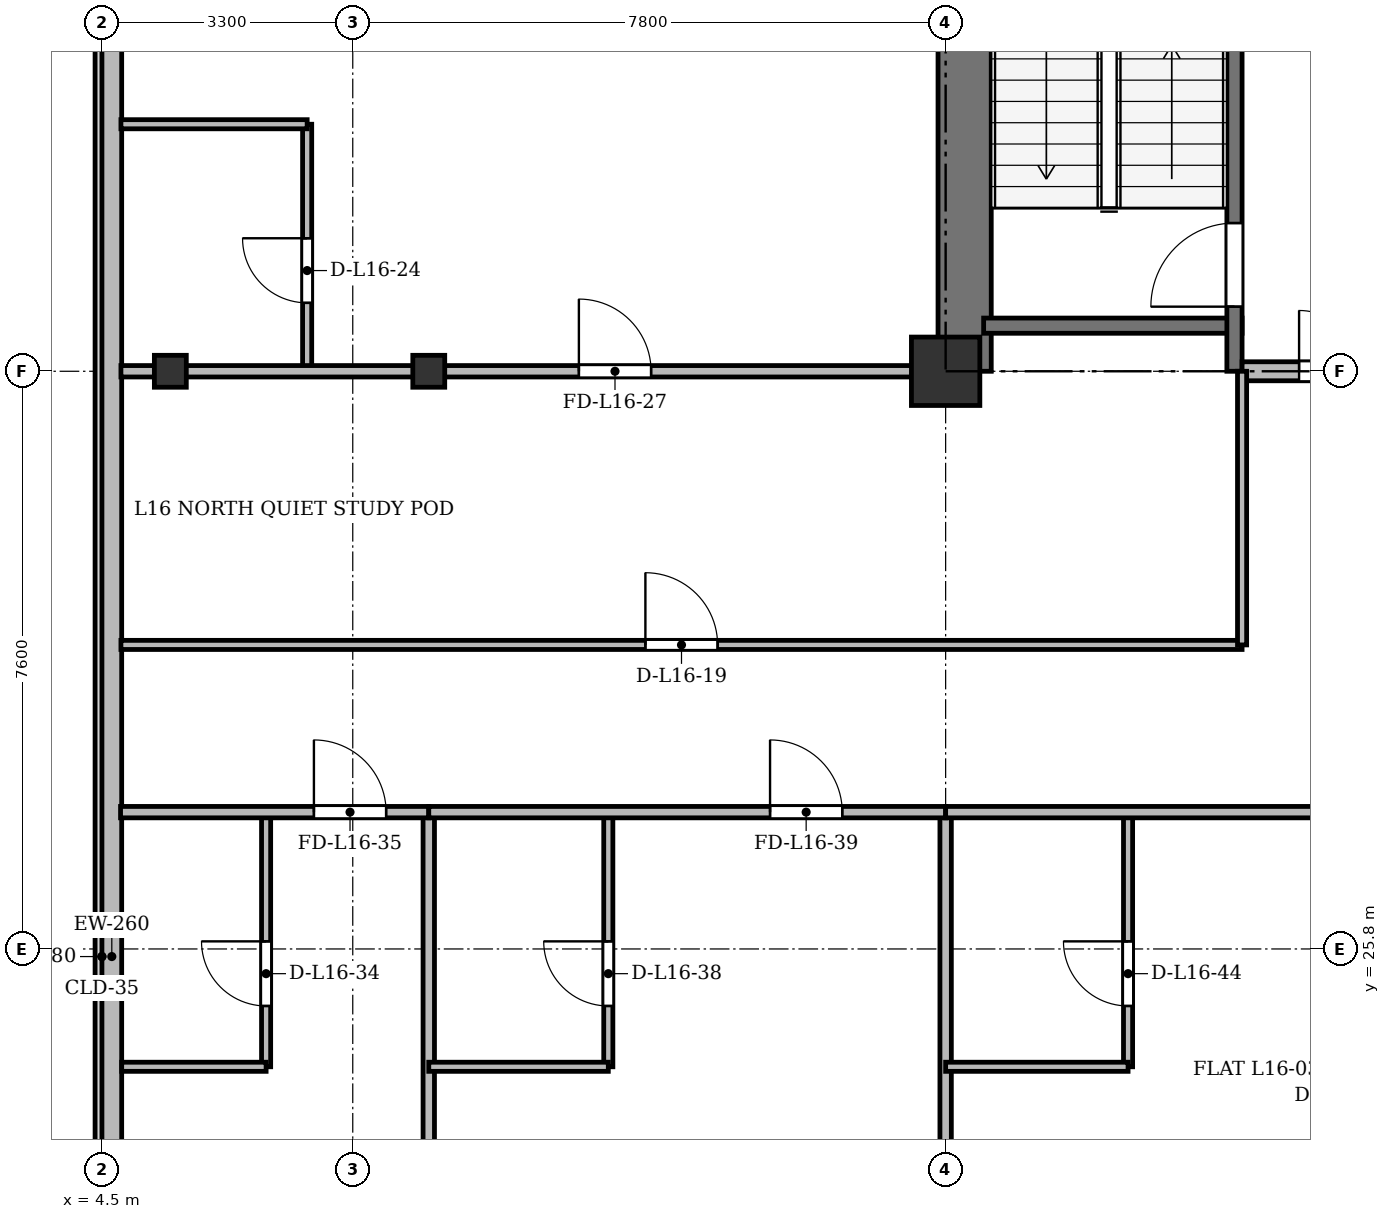
"""IFC4 building model, lengths in metres.
Left out: names, types, materials, properties, quantities, classifications, styles, units other than length and angle.
Written with IfcOpenShell. Run it as: python <this file> out.ifc"""

import sys

from ifc_helpers import new_model, si_unit, direction, frame, frame_2d, origin, origin_2d, place, context, subcontext, project, spatial, rectangle, i_section, extrude, source, transform, mapped, element, fill, save


model = new_model("IFC4")
c1 = context("Model", 3, precision=1e-05, world=origin(), true_north=direction((0.0, 1.0)))
c2 = subcontext(c1, "Body", "Model", "MODEL_VIEW")
j1 = project(units=[si_unit("LENGTHUNIT", "METRE"), si_unit("PLANEANGLEUNIT", "RADIAN")], contexts=[c1])
p1 = place(None, origin())
s1 = spatial("IfcSite", under=j1, at=p1, CompositionType="ELEMENT")
p2 = place(p1, origin())
s2 = spatial("IfcBuilding", under=s1, at=p2, CompositionType="ELEMENT")
p3 = place(p2, frame((0.0, 0.0, 63.1)))
s3 = spatial("IfcBuildingStorey", under=s2, at=p3, CompositionType="ELEMENT", Elevation=63.1)
m1 = source(origin(), c2, "Body", "SweptSolid", [
    extrude(i_section(OverallWidth=0.42, OverallDepth=0.42, WebThickness=0.026, FlangeThickness=0.04, at=origin_2d()), origin(), (0.0, 0.0, 1.0), 3.6),
])
for number, where, z_axis, x_axis in (
    (1, (5.4, 33.4, 0.0), (0.0, 0.0, 1.0), (1.0, 0.0, 0.0)),
    (2, (8.8, 33.4, 0.0), (0.0, 0.0, 1.0), (1.0, 0.0, 0.0)),
):
    element("IfcColumn", number, at=place(p3, frame(where, z_axis=z_axis, x_axis=x_axis)), inside=s3, PredefinedType="COLUMN", context=c2, shape_type="MappedRepresentation", body=[
        mapped(m1, transform((0.0, 0.0, 0.0), x_axis=(1.0, 0.0, 0.0), y_axis=(0.0, 1.0, 0.0), z_axis=(0.0, 0.0, 1.0), scale=1.0)),
    ])
m2 = source(origin(), c2, "Body", "SweptSolid", [
    extrude(rectangle(XDim=0.9, YDim=0.9, at=origin_2d()), origin(), (0.0, 0.0, 1.0), 3.6),
])
p4 = place(p3, frame((15.6, 33.4, 0.0), z_axis=(0.0, 0.0, 1.0), x_axis=(1.0, 0.0, 0.0)))
e3 = element("IfcColumn", 3, at=p4, inside=s3, PredefinedType="COLUMN", context=c2, shape_type="MappedRepresentation", body=[
    mapped(m2, transform((0.0, 0.0, 0.0), x_axis=(1.0, 0.0, 0.0), y_axis=(0.0, 1.0, 0.0), z_axis=(0.0, 0.0, 1.0), scale=1.0)),
])
p5 = place(p3, frame((4.63, 5.9, 0.0), z_axis=(0.0, 0.0, 1.0), x_axis=(0.0, 1.0, 0.0)))
e4 = element("IfcWall", 4, at=p5, inside=s3, PredefinedType="SOLIDWALL", context=c2, shape_type="SweptSolid", body=[
    extrude(rectangle(XDim=39.6, YDim=0.26, at=frame_2d((19.8, 0.0))), origin(), (0.0, 0.0, 1.0), 3.34),
])
p6 = place(p5, frame((1.45, 0.0, 0.92)))
e5 = element("IfcOpeningElement", 5, at=p6, cuts=e4, PredefinedType="OPENING", context=c2, shape_type="SweptSolid", body=[
    extrude(rectangle(XDim=1.2, YDim=1.65, at=frame_2d((0.6, 0.825))), frame((0.0, 0.14, 0.0), z_axis=(0.0, -1.0, 0.0), x_axis=(1.0, 0.0, 0.0)), (0.0, 0.0, 1.0), 0.28),
])
p7 = place(p5, frame((4.2, 0.0, 0.92)))
e6 = element("IfcOpeningElement", 6, at=p7, cuts=e4, PredefinedType="OPENING", context=c2, shape_type="SweptSolid", body=[
    extrude(rectangle(XDim=2.6, YDim=1.9, at=frame_2d((1.3, 0.95))), frame((0.0, 0.14, 0.0), z_axis=(0.0, -1.0, 0.0), x_axis=(1.0, 0.0, 0.0)), (0.0, 0.0, 1.0), 0.28),
])
p8 = place(p5, frame((8.4, 0.0, 0.92)))
e7 = element("IfcOpeningElement", 7, at=p8, cuts=e4, PredefinedType="OPENING", context=c2, shape_type="SweptSolid", body=[
    extrude(rectangle(XDim=2.6, YDim=1.9, at=frame_2d((1.3, 0.95))), frame((0.0, 0.14, 0.0), z_axis=(0.0, -1.0, 0.0), x_axis=(1.0, 0.0, 0.0)), (0.0, 0.0, 1.0), 0.28),
])
p9 = place(p5, frame((33.9, 0.0, 0.92)))
e8 = element("IfcOpeningElement", 8, at=p9, cuts=e4, PredefinedType="OPENING", context=c2, shape_type="SweptSolid", body=[
    extrude(rectangle(XDim=1.2, YDim=1.65, at=frame_2d((0.6, 0.825))), frame((0.0, 0.14, 0.0), z_axis=(0.0, -1.0, 0.0), x_axis=(1.0, 0.0, 0.0)), (0.0, 0.0, 1.0), 0.28),
])
p10 = place(p5, frame((37.25, 0.0, 0.92)))
e9 = element("IfcOpeningElement", 9, at=p10, cuts=e4, PredefinedType="OPENING", context=c2, shape_type="SweptSolid", body=[
    extrude(rectangle(XDim=1.2, YDim=1.65, at=frame_2d((0.6, 0.825))), frame((0.0, 0.14, 0.0), z_axis=(0.0, -1.0, 0.0), x_axis=(1.0, 0.0, 0.0)), (0.0, 0.0, 1.0), 0.28),
])
p11 = place(p3, frame((15.85, 33.4, 0.0), z_axis=(0.0, 0.0, 1.0), x_axis=(0.0, 1.0, 0.0)))
e10 = element("IfcWall", 10, at=p11, inside=s3, PredefinedType="SHEAR", context=c2, shape_type="SweptSolid", body=[
    extrude(rectangle(XDim=11.7, YDim=0.7, at=frame_2d((5.85, 0.0))), origin(), (0.0, 0.0, 1.0), 3.34),
])
p12 = place(p3, frame((16.1, 34.0, 0.0), z_axis=(0.0, 0.0, 1.0), x_axis=(1.0, 0.0, 0.0)))
e11 = element("IfcWall", 11, at=p12, inside=s3, PredefinedType="SHEAR", context=c2, shape_type="SweptSolid", body=[
    extrude(rectangle(XDim=3.4, YDim=0.2, at=frame_2d((1.7, 0.0))), origin(), (0.0, 0.0, 1.0), 3.34),
])
p13 = place(p3, frame((19.4, 33.4, 0.0), z_axis=(0.0, 0.0, 1.0), x_axis=(0.0, 1.0, 0.0)))
e12 = element("IfcWall", 12, at=p13, inside=s3, PredefinedType="SHEAR", context=c2, shape_type="SweptSolid", body=[
    extrude(rectangle(XDim=11.1, YDim=0.2, at=frame_2d((5.55, 0.0))), origin(), (0.0, 0.0, 1.0), 3.34),
])
p14 = place(p13, frame((0.85, 0.0, 0.0)))
e13 = element("IfcOpeningElement", 13, at=p14, cuts=e12, PredefinedType="OPENING", context=c2, shape_type="SweptSolid", body=[
    extrude(rectangle(XDim=1.1, YDim=2.15, at=frame_2d((0.55, 1.075))), frame((0.0, 0.11, 0.0), z_axis=(0.0, -1.0, 0.0), x_axis=(1.0, 0.0, 0.0)), (0.0, 0.0, 1.0), 0.22),
])
p15 = place(p3, frame((19.5, 33.4, 0.0), z_axis=(0.0, 0.0, 1.0), x_axis=(1.0, 0.0, 0.0)))
e14 = element("IfcWall", 14, at=p15, inside=s3, PredefinedType="PARTITIONING", context=c2, shape_type="SweptSolid", body=[
    extrude(rectangle(XDim=6.8, YDim=0.25, at=frame_2d((3.4, 0.0))), origin(), (0.0, 0.0, 1.0), 2.69),
])
p16 = place(p15, frame((0.75, 0.0, 0.0)))
e15 = element("IfcOpeningElement", 15, at=p16, cuts=e14, PredefinedType="OPENING", context=c2, shape_type="SweptSolid", body=[
    extrude(rectangle(XDim=1.6, YDim=2.2, at=frame_2d((0.8, 1.1))), frame((0.0, 0.135, 0.0), z_axis=(0.0, -1.0, 0.0), x_axis=(1.0, 0.0, 0.0)), (0.0, 0.0, 1.0), 0.27),
])
p17 = place(p3, frame((4.75, 29.8, 0.0), z_axis=(0.0, 0.0, 1.0), x_axis=(1.0, 0.0, 0.0)))
e16 = element("IfcWall", 16, at=p17, inside=s3, PredefinedType="PARTITIONING", context=c2, shape_type="SweptSolid", body=[
    extrude(rectangle(XDim=14.75, YDim=0.12, at=frame_2d((7.375, 0.0))), origin(), (0.0, 0.0, 1.0), 2.752),
])
p18 = place(p17, frame((6.9, 0.0, 0.0)))
e17 = element("IfcOpeningElement", 17, at=p18, cuts=e16, PredefinedType="OPENING", context=c2, shape_type="SweptSolid", body=[
    extrude(rectangle(XDim=0.95, YDim=2.15, at=frame_2d((0.475, 1.075))), frame((0.0, 0.07, 0.0), z_axis=(0.0, -1.0, 0.0), x_axis=(1.0, 0.0, 0.0)), (0.0, 0.0, 1.0), 0.14),
])
p19 = place(p3, frame((19.5, 29.8, 0.0), z_axis=(0.0, 0.0, 1.0), x_axis=(0.0, 1.0, 0.0)))
e18 = element("IfcWall", 18, at=p19, inside=s3, PredefinedType="PARTITIONING", context=c2, shape_type="SweptSolid", body=[
    extrude(rectangle(XDim=3.6, YDim=0.12, at=frame_2d((1.8, 0.0))), origin(), (0.0, 0.0, 1.0), 2.69),
])
p20 = place(p3, frame((7.2, 33.4, 0.0), z_axis=(0.0, 0.0, 1.0), x_axis=(0.0, 1.0, 0.0)))
e19 = element("IfcWall", 19, at=p20, inside=s3, PredefinedType="PARTITIONING", context=c2, shape_type="SweptSolid", body=[
    extrude(rectangle(XDim=3.25, YDim=0.12, at=frame_2d((1.625, 0.0))), origin(), (0.0, 0.0, 1.0), 2.69),
])
p21 = place(p20, frame((0.9, 0.0, 0.0)))
e20 = element("IfcOpeningElement", 20, at=p21, cuts=e19, PredefinedType="OPENING", context=c2, shape_type="SweptSolid", body=[
    extrude(rectangle(XDim=0.85, YDim=2.1, at=frame_2d((0.425, 1.05))), frame((0.0, 0.07, 0.0), z_axis=(0.0, -1.0, 0.0), x_axis=(1.0, 0.0, 0.0)), (0.0, 0.0, 1.0), 0.14),
])
p22 = place(p3, frame((4.75, 36.65, 0.0), z_axis=(0.0, 0.0, 1.0), x_axis=(1.0, 0.0, 0.0)))
e21 = element("IfcWall", 21, at=p22, inside=s3, PredefinedType="PARTITIONING", context=c2, shape_type="SweptSolid", body=[
    extrude(rectangle(XDim=2.45, YDim=0.12, at=frame_2d((1.225, 0.0))), origin(), (0.0, 0.0, 1.0), 2.752),
])
p23 = place(p3, frame((4.75, 33.4, 0.0), z_axis=(0.0, 0.0, 1.0), x_axis=(1.0, 0.0, 0.0)))
e22 = element("IfcWall", 22, at=p23, inside=s3, PredefinedType="PARTITIONING", context=c2, shape_type="SweptSolid", body=[
    extrude(rectangle(XDim=10.85, YDim=0.15, at=frame_2d((5.425, 0.0))), origin(), (0.0, 0.0, 1.0), 2.69),
])
p24 = place(p23, frame((6.025, 0.0, 0.0)))
e23 = element("IfcOpeningElement", 23, at=p24, cuts=e22, PredefinedType="OPENING", context=c2, shape_type="SweptSolid", body=[
    extrude(rectangle(XDim=0.95, YDim=2.15, at=frame_2d((0.475, 1.075))), frame((0.0, 0.085, 0.0), z_axis=(0.0, -1.0, 0.0), x_axis=(1.0, 0.0, 0.0)), (0.0, 0.0, 1.0), 0.17),
])
for number, where, z_axis, x_axis in (
    (24, (8.8, 3.145, 0.0), (0.0, 0.0, 1.0), (0.0, 1.0, 0.0)),
    (25, (15.6, 3.145, 0.0), (0.0, 0.0, 1.0), (0.0, 1.0, 0.0)),
):
    element("IfcWall", number, at=place(p3, frame(where, z_axis=z_axis, x_axis=x_axis)), inside=s3, PredefinedType="PARTITIONING", context=c2, shape_type="SweptSolid", body=[
        extrude(rectangle(XDim=24.455, YDim=0.15, at=frame_2d((12.228, 0.0))), origin(), (0.0, 0.0, 1.0), 2.752),
    ])
p25 = place(p3, frame((6.66, 24.25, 0.0), z_axis=(0.0, 0.0, 1.0), x_axis=(0.0, 1.0, 0.0)))
e26 = element("IfcWall", 26, at=p25, inside=s3, PredefinedType="PARTITIONING", context=c2, shape_type="SweptSolid", body=[
    extrude(rectangle(XDim=3.35, YDim=0.12, at=frame_2d((1.675, 0.0))), origin(), (0.0, 0.0, 1.0), 2.94),
])
p26 = place(p25, frame((0.8, 0.0, 0.0)))
e27 = element("IfcOpeningElement", 27, at=p26, cuts=e26, PredefinedType="OPENING", context=c2, shape_type="SweptSolid", body=[
    extrude(rectangle(XDim=0.85, YDim=2.1, at=frame_2d((0.425, 1.05))), frame((0.0, 0.07, 0.0), z_axis=(0.0, -1.0, 0.0), x_axis=(1.0, 0.0, 0.0)), (0.0, 0.0, 1.0), 0.14),
])
p27 = place(p3, frame((4.76, 24.25, 0.0), z_axis=(0.0, 0.0, 1.0), x_axis=(1.0, 0.0, 0.0)))
e28 = element("IfcWall", 28, at=p27, inside=s3, PredefinedType="PARTITIONING", context=c2, shape_type="SweptSolid", body=[
    extrude(rectangle(XDim=1.9, YDim=0.12, at=frame_2d((0.95, 0.0))), origin(), (0.0, 0.0, 1.0), 2.752),
])
p28 = place(p3, frame((4.745, 27.6, 0.0), z_axis=(0.0, 0.0, 1.0), x_axis=(1.0, 0.0, 0.0)))
e29 = element("IfcWall", 29, at=p28, inside=s3, PredefinedType="PARTITIONING", context=c2, shape_type="SweptSolid", body=[
    extrude(rectangle(XDim=4.055, YDim=0.15, at=frame_2d((2.027, 0.0))), origin(), (0.0, 0.0, 1.0), 2.752),
])
p29 = place(p28, frame((2.544, 0.0, 0.0)))
e30 = element("IfcOpeningElement", 30, at=p29, cuts=e29, PredefinedType="OPENING", context=c2, shape_type="SweptSolid", body=[
    extrude(rectangle(XDim=0.95, YDim=2.15, at=frame_2d((0.475, 1.075))), frame((0.0, 0.085, 0.0), z_axis=(0.0, -1.0, 0.0), x_axis=(1.0, 0.0, 0.0)), (0.0, 0.0, 1.0), 0.17),
])
p30 = place(p3, frame((11.162, 24.25, 0.0), z_axis=(0.0, 0.0, 1.0), x_axis=(0.0, 1.0, 0.0)))
e31 = element("IfcWall", 31, at=p30, inside=s3, PredefinedType="PARTITIONING", context=c2, shape_type="SweptSolid", body=[
    extrude(rectangle(XDim=3.35, YDim=0.12, at=frame_2d((1.675, 0.0))), origin(), (0.0, 0.0, 1.0), 2.94),
])
p31 = place(p30, frame((0.8, 0.0, 0.0)))
e32 = element("IfcOpeningElement", 32, at=p31, cuts=e31, PredefinedType="OPENING", context=c2, shape_type="SweptSolid", body=[
    extrude(rectangle(XDim=0.85, YDim=2.1, at=frame_2d((0.425, 1.05))), frame((0.0, 0.07, 0.0), z_axis=(0.0, -1.0, 0.0), x_axis=(1.0, 0.0, 0.0)), (0.0, 0.0, 1.0), 0.14),
])
p32 = place(p3, frame((8.8, 24.25, 0.0), z_axis=(0.0, 0.0, 1.0), x_axis=(1.0, 0.0, 0.0)))
e33 = element("IfcWall", 33, at=p32, inside=s3, PredefinedType="PARTITIONING", context=c2, shape_type="SweptSolid", body=[
    extrude(rectangle(XDim=2.362, YDim=0.12, at=frame_2d((1.181, 0.0))), origin(), (0.0, 0.0, 1.0), 2.752),
])
p33 = place(p3, frame((8.8, 27.6, 0.0), z_axis=(0.0, 0.0, 1.0), x_axis=(1.0, 0.0, 0.0)))
e34 = element("IfcWall", 34, at=p33, inside=s3, PredefinedType="PARTITIONING", context=c2, shape_type="SweptSolid", body=[
    extrude(rectangle(XDim=6.8, YDim=0.15, at=frame_2d((3.4, 0.0))), origin(), (0.0, 0.0, 1.0), 2.752),
])
p34 = place(p33, frame((4.49, 0.0, 0.0)))
e35 = element("IfcOpeningElement", 35, at=p34, cuts=e34, PredefinedType="OPENING", context=c2, shape_type="SweptSolid", body=[
    extrude(rectangle(XDim=0.95, YDim=2.15, at=frame_2d((0.475, 1.075))), frame((0.0, 0.085, 0.0), z_axis=(0.0, -1.0, 0.0), x_axis=(1.0, 0.0, 0.0)), (0.0, 0.0, 1.0), 0.17),
])
p35 = place(p3, frame((18.0, 24.25, 0.0), z_axis=(0.0, 0.0, 1.0), x_axis=(0.0, 1.0, 0.0)))
e36 = element("IfcWall", 36, at=p35, inside=s3, PredefinedType="PARTITIONING", context=c2, shape_type="SweptSolid", body=[
    extrude(rectangle(XDim=3.35, YDim=0.12, at=frame_2d((1.675, 0.0))), origin(), (0.0, 0.0, 1.0), 2.94),
])
p36 = place(p35, frame((0.8, 0.0, 0.0)))
e37 = element("IfcOpeningElement", 37, at=p36, cuts=e36, PredefinedType="OPENING", context=c2, shape_type="SweptSolid", body=[
    extrude(rectangle(XDim=0.85, YDim=2.1, at=frame_2d((0.425, 1.05))), frame((0.0, 0.07, 0.0), z_axis=(0.0, -1.0, 0.0), x_axis=(1.0, 0.0, 0.0)), (0.0, 0.0, 1.0), 0.14),
])
p37 = place(p3, frame((15.6, 24.25, 0.0), z_axis=(0.0, 0.0, 1.0), x_axis=(1.0, 0.0, 0.0)))
e38 = element("IfcWall", 38, at=p37, inside=s3, PredefinedType="PARTITIONING", context=c2, shape_type="SweptSolid", body=[
    extrude(rectangle(XDim=2.4, YDim=0.12, at=frame_2d((1.2, 0.0))), origin(), (0.0, 0.0, 1.0), 2.752),
])
p38 = place(p3, frame((15.6, 27.6, 0.0), z_axis=(0.0, 0.0, 1.0), x_axis=(1.0, 0.0, 0.0)))
e39 = element("IfcWall", 39, at=p38, inside=s3, PredefinedType="PARTITIONING", context=c2, shape_type="SweptSolid", body=[
    extrude(rectangle(XDim=7.8, YDim=0.15, at=frame_2d((3.9, 0.0))), origin(), (0.0, 0.0, 1.0), 2.752),
])
p39 = place(p38, frame((5.172, 0.0, 0.0)))
e40 = element("IfcOpeningElement", 40, at=p39, cuts=e39, PredefinedType="OPENING", context=c2, shape_type="SweptSolid", body=[
    extrude(rectangle(XDim=0.95, YDim=2.15, at=frame_2d((0.475, 1.075))), frame((0.0, 0.085, 0.0), z_axis=(0.0, -1.0, 0.0), x_axis=(1.0, 0.0, 0.0)), (0.0, 0.0, 1.0), 0.17),
])
m3 = source(origin(), c2, "Body", "SweptSolid", [
    extrude(rectangle(XDim=1.1, YDim=2.15, at=frame_2d((0.55, 1.075))), frame((0.0, 0.025, 0.0), z_axis=(0.0, -1.0, 0.0), x_axis=(1.0, 0.0, 0.0)), (0.0, 0.0, 1.0), 0.05),
])
p40 = place(p14, origin())
e41 = element("IfcDoor", 41, at=p40, inside=s3, OperationType="SINGLE_SWING_LEFT", PredefinedType="DOOR", context=c2, shape_type="MappedRepresentation", body=[
    mapped(m3, transform((0.0, 0.0, 0.0), x_axis=(1.0, 0.0, 0.0), y_axis=(0.0, 1.0, 0.0), z_axis=(0.0, 0.0, 1.0), scale=1.0)),
])
fill(e13, e41)
m4 = source(origin(), c2, "Body", "SweptSolid", [
    extrude(rectangle(XDim=1.6, YDim=2.2, at=frame_2d((0.8, 1.1))), frame((0.0, 0.025, 0.0), z_axis=(0.0, -1.0, 0.0), x_axis=(1.0, 0.0, 0.0)), (0.0, 0.0, 1.0), 0.05),
])
p41 = place(p16, origin())
e42 = element("IfcDoor", 42, at=p41, inside=s3, OperationType="DOUBLE_DOOR_SINGLE_SWING", PredefinedType="DOOR", context=c2, shape_type="MappedRepresentation", body=[
    mapped(m4, transform((0.0, 0.0, 0.0), x_axis=(1.0, 0.0, 0.0), y_axis=(0.0, 1.0, 0.0), z_axis=(0.0, 0.0, 1.0), scale=1.0)),
])
fill(e15, e42)
m5 = source(origin(), c2, "Body", "SweptSolid", [
    extrude(rectangle(XDim=0.95, YDim=2.15, at=frame_2d((0.475, 1.075))), frame((0.0, 0.025, 0.0), z_axis=(0.0, -1.0, 0.0), x_axis=(1.0, 0.0, 0.0)), (0.0, 0.0, 1.0), 0.05),
])
p42 = place(p18, origin())
e43 = element("IfcDoor", 43, at=p42, inside=s3, OperationType="SINGLE_SWING_LEFT", PredefinedType="DOOR", context=c2, shape_type="MappedRepresentation", body=[
    mapped(m5, transform((0.0, 0.0, 0.0), x_axis=(1.0, 0.0, 0.0), y_axis=(0.0, 1.0, 0.0), z_axis=(0.0, 0.0, 1.0), scale=1.0)),
])
fill(e17, e43)
m6 = source(origin(), c2, "Body", "SweptSolid", [
    extrude(rectangle(XDim=0.85, YDim=2.1, at=frame_2d((0.425, 1.05))), frame((0.0, 0.025, 0.0), z_axis=(0.0, -1.0, 0.0), x_axis=(1.0, 0.0, 0.0)), (0.0, 0.0, 1.0), 0.05),
])
p43 = place(p21, origin())
e44 = element("IfcDoor", 44, at=p43, inside=s3, OperationType="SINGLE_SWING_RIGHT", PredefinedType="DOOR", context=c2, shape_type="MappedRepresentation", body=[
    mapped(m6, transform((0.0, 0.0, 0.0), x_axis=(1.0, 0.0, 0.0), y_axis=(0.0, 1.0, 0.0), z_axis=(0.0, 0.0, 1.0), scale=1.0)),
])
fill(e20, e44)
p44 = place(p24, origin())
e45 = element("IfcDoor", 45, at=p44, inside=s3, OperationType="SINGLE_SWING_LEFT", PredefinedType="DOOR", context=c2, shape_type="MappedRepresentation", body=[
    mapped(m5, transform((0.0, 0.0, 0.0), x_axis=(1.0, 0.0, 0.0), y_axis=(0.0, 1.0, 0.0), z_axis=(0.0, 0.0, 1.0), scale=1.0)),
])
fill(e23, e45)
p45 = place(p26, origin())
e46 = element("IfcDoor", 46, at=p45, inside=s3, OperationType="SINGLE_SWING_RIGHT", PredefinedType="DOOR", context=c2, shape_type="MappedRepresentation", body=[
    mapped(m6, transform((0.0, 0.0, 0.0), x_axis=(1.0, 0.0, 0.0), y_axis=(0.0, 1.0, 0.0), z_axis=(0.0, 0.0, 1.0), scale=1.0)),
])
fill(e27, e46)
p46 = place(p29, origin())
e47 = element("IfcDoor", 47, at=p46, inside=s3, OperationType="SINGLE_SWING_LEFT", PredefinedType="DOOR", context=c2, shape_type="MappedRepresentation", body=[
    mapped(m5, transform((0.0, 0.0, 0.0), x_axis=(1.0, 0.0, 0.0), y_axis=(0.0, 1.0, 0.0), z_axis=(0.0, 0.0, 1.0), scale=1.0)),
])
fill(e30, e47)
p47 = place(p31, origin())
e48 = element("IfcDoor", 48, at=p47, inside=s3, OperationType="SINGLE_SWING_RIGHT", PredefinedType="DOOR", context=c2, shape_type="MappedRepresentation", body=[
    mapped(m6, transform((0.0, 0.0, 0.0), x_axis=(1.0, 0.0, 0.0), y_axis=(0.0, 1.0, 0.0), z_axis=(0.0, 0.0, 1.0), scale=1.0)),
])
fill(e32, e48)
p48 = place(p34, origin())
e49 = element("IfcDoor", 49, at=p48, inside=s3, OperationType="SINGLE_SWING_LEFT", PredefinedType="DOOR", context=c2, shape_type="MappedRepresentation", body=[
    mapped(m5, transform((0.0, 0.0, 0.0), x_axis=(1.0, 0.0, 0.0), y_axis=(0.0, 1.0, 0.0), z_axis=(0.0, 0.0, 1.0), scale=1.0)),
])
fill(e35, e49)
p49 = place(p36, origin())
e50 = element("IfcDoor", 50, at=p49, inside=s3, OperationType="SINGLE_SWING_RIGHT", PredefinedType="DOOR", context=c2, shape_type="MappedRepresentation", body=[
    mapped(m6, transform((0.0, 0.0, 0.0), x_axis=(1.0, 0.0, 0.0), y_axis=(0.0, 1.0, 0.0), z_axis=(0.0, 0.0, 1.0), scale=1.0)),
])
fill(e37, e50)
save(model, sys.argv[1])
